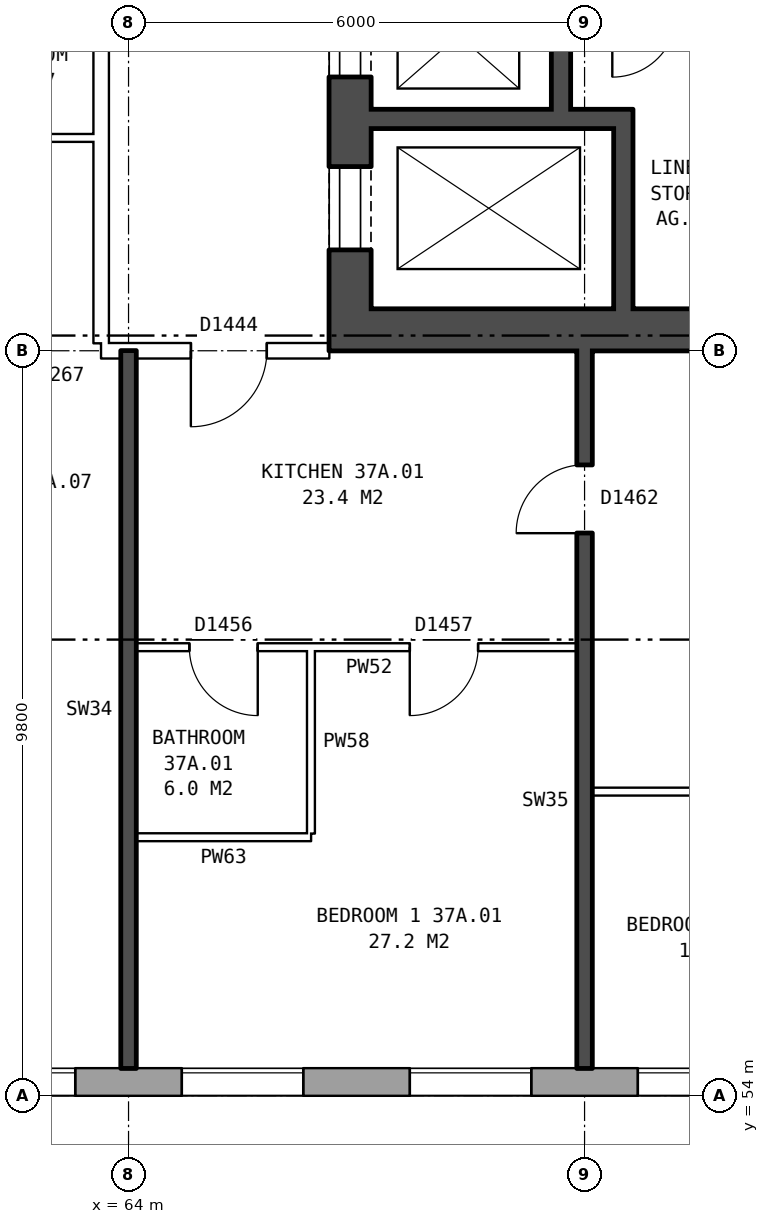
"""IFC4 building model, lengths in metres.
Left out: names, types, materials, properties, quantities, classifications, styles, units other than length and angle.
Written with IfcOpenShell. Run it as: python <this file> out.ifc"""

import sys

from ifc_helpers import new_model, si_unit, direction, frame, frame_2d, origin, place, context, subcontext, project, spatial, rectangle, extrude, element, fill, save


model = new_model("IFC4")
c1 = context("Model", 3, precision=1e-05, world=origin(), true_north=direction((0.0, 1.0)))
c2 = subcontext(c1, "Body", "Model", "MODEL_VIEW")
j1 = project(units=[si_unit("LENGTHUNIT", "METRE"), si_unit("PLANEANGLEUNIT", "RADIAN")], contexts=[c1])
p1 = place(None, origin())
s1 = spatial("IfcSite", under=j1, at=p1, CompositionType="ELEMENT")
p2 = place(p1, origin())
s2 = spatial("IfcBuilding", under=s1, at=p2, CompositionType="ELEMENT")
p3 = place(p2, frame((0.0, 0.0, 133.0)))
s3 = spatial("IfcBuildingStorey", under=s2, at=p3, CompositionType="ELEMENT", Elevation=133.0)
p4 = place(p3, frame((29.825, 54.18, 0.0), z_axis=(0.0, 0.0, 1.0), x_axis=(1.0, 0.0, 0.0)))
e1 = element("IfcWall", 1, at=p4, inside=s3, PredefinedType="STANDARD", context=c2, shape_type="SweptSolid", body=[
    extrude(rectangle(XDim=43.101, YDim=0.36, at=frame_2d((21.55, 0.0))), origin(), (0.0, 0.0, 1.0), 2.85),
])
p5 = place(p4, frame((1.875, 0.0, 0.8)))
e2 = element("IfcOpeningElement", 2, at=p5, cuts=e1, PredefinedType="OPENING", context=c2, shape_type="SweptSolid", body=[
    extrude(rectangle(XDim=1.6, YDim=1.8, at=frame_2d((0.8, 0.9))), frame((0.0, 0.19, 0.0), z_axis=(0.0, -1.0, 0.0), x_axis=(1.0, 0.0, 0.0)), (0.0, 0.0, 1.0), 0.38),
])
p6 = place(p4, frame((4.875, 0.0, 0.8)))
e3 = element("IfcOpeningElement", 3, at=p6, cuts=e1, PredefinedType="OPENING", context=c2, shape_type="SweptSolid", body=[
    extrude(rectangle(XDim=1.6, YDim=1.8, at=frame_2d((0.8, 0.9))), frame((0.0, 0.19, 0.0), z_axis=(0.0, -1.0, 0.0), x_axis=(1.0, 0.0, 0.0)), (0.0, 0.0, 1.0), 0.38),
])
p7 = place(p4, frame((7.875, 0.0, 0.8)))
e4 = element("IfcOpeningElement", 4, at=p7, cuts=e1, PredefinedType="OPENING", context=c2, shape_type="SweptSolid", body=[
    extrude(rectangle(XDim=1.6, YDim=1.8, at=frame_2d((0.8, 0.9))), frame((0.0, 0.19, 0.0), z_axis=(0.0, -1.0, 0.0), x_axis=(1.0, 0.0, 0.0)), (0.0, 0.0, 1.0), 0.38),
])
p8 = place(p4, frame((10.875, 0.0, 0.8)))
e5 = element("IfcOpeningElement", 5, at=p8, cuts=e1, PredefinedType="OPENING", context=c2, shape_type="SweptSolid", body=[
    extrude(rectangle(XDim=1.6, YDim=1.8, at=frame_2d((0.8, 0.9))), frame((0.0, 0.19, 0.0), z_axis=(0.0, -1.0, 0.0), x_axis=(1.0, 0.0, 0.0)), (0.0, 0.0, 1.0), 0.38),
])
p9 = place(p4, frame((14.275, 0.0, 0.8)))
e6 = element("IfcOpeningElement", 6, at=p9, cuts=e1, PredefinedType="OPENING", context=c2, shape_type="SweptSolid", body=[
    extrude(rectangle(XDim=0.8, YDim=0.9, at=frame_2d((0.4, 0.45))), frame((0.0, 0.19, 0.0), z_axis=(0.0, -1.0, 0.0), x_axis=(1.0, 0.0, 0.0)), (0.0, 0.0, 1.0), 0.38),
])
p10 = place(p4, frame((16.875, 0.0, 0.8)))
e7 = element("IfcOpeningElement", 7, at=p10, cuts=e1, PredefinedType="OPENING", context=c2, shape_type="SweptSolid", body=[
    extrude(rectangle(XDim=1.6, YDim=1.8, at=frame_2d((0.8, 0.9))), frame((0.0, 0.19, 0.0), z_axis=(0.0, -1.0, 0.0), x_axis=(1.0, 0.0, 0.0)), (0.0, 0.0, 1.0), 0.38),
])
p11 = place(p4, frame((19.875, 0.0, 0.8)))
e8 = element("IfcOpeningElement", 8, at=p11, cuts=e1, PredefinedType="OPENING", context=c2, shape_type="SweptSolid", body=[
    extrude(rectangle(XDim=1.6, YDim=1.8, at=frame_2d((0.8, 0.9))), frame((0.0, 0.19, 0.0), z_axis=(0.0, -1.0, 0.0), x_axis=(1.0, 0.0, 0.0)), (0.0, 0.0, 1.0), 0.38),
])
p12 = place(p4, frame((22.875, 0.0, 0.8)))
e9 = element("IfcOpeningElement", 9, at=p12, cuts=e1, PredefinedType="OPENING", context=c2, shape_type="SweptSolid", body=[
    extrude(rectangle(XDim=1.6, YDim=1.8, at=frame_2d((0.8, 0.9))), frame((0.0, 0.19, 0.0), z_axis=(0.0, -1.0, 0.0), x_axis=(1.0, 0.0, 0.0)), (0.0, 0.0, 1.0), 0.38),
])
p13 = place(p4, frame((25.875, 0.0, 0.8)))
e10 = element("IfcOpeningElement", 10, at=p13, cuts=e1, PredefinedType="OPENING", context=c2, shape_type="SweptSolid", body=[
    extrude(rectangle(XDim=1.6, YDim=1.8, at=frame_2d((0.8, 0.9))), frame((0.0, 0.19, 0.0), z_axis=(0.0, -1.0, 0.0), x_axis=(1.0, 0.0, 0.0)), (0.0, 0.0, 1.0), 0.38),
])
p14 = place(p4, frame((28.375, 0.0, 0.25)))
e11 = element("IfcOpeningElement", 11, at=p14, cuts=e1, PredefinedType="OPENING", context=c2, shape_type="SweptSolid", body=[
    extrude(rectangle(XDim=1.0, YDim=0.9, at=frame_2d((0.5, 0.45))), frame((0.0, 0.19, 0.0), z_axis=(0.0, -1.0, 0.0), x_axis=(1.0, 0.0, 0.0)), (0.0, 0.0, 1.0), 0.38),
])
p15 = place(p4, frame((31.875, 0.0, 0.8)))
e12 = element("IfcOpeningElement", 12, at=p15, cuts=e1, PredefinedType="OPENING", context=c2, shape_type="SweptSolid", body=[
    extrude(rectangle(XDim=1.6, YDim=1.8, at=frame_2d((0.8, 0.9))), frame((0.0, 0.19, 0.0), z_axis=(0.0, -1.0, 0.0), x_axis=(1.0, 0.0, 0.0)), (0.0, 0.0, 1.0), 0.38),
])
p16 = place(p4, frame((34.875, 0.0, 0.8)))
e13 = element("IfcOpeningElement", 13, at=p16, cuts=e1, PredefinedType="OPENING", context=c2, shape_type="SweptSolid", body=[
    extrude(rectangle(XDim=1.6, YDim=1.8, at=frame_2d((0.8, 0.9))), frame((0.0, 0.19, 0.0), z_axis=(0.0, -1.0, 0.0), x_axis=(1.0, 0.0, 0.0)), (0.0, 0.0, 1.0), 0.38),
])
p17 = place(p4, frame((37.875, 0.0, 0.8)))
e14 = element("IfcOpeningElement", 14, at=p17, cuts=e1, PredefinedType="OPENING", context=c2, shape_type="SweptSolid", body=[
    extrude(rectangle(XDim=1.6, YDim=1.8, at=frame_2d((0.8, 0.9))), frame((0.0, 0.19, 0.0), z_axis=(0.0, -1.0, 0.0), x_axis=(1.0, 0.0, 0.0)), (0.0, 0.0, 1.0), 0.38),
])
p18 = place(p4, frame((40.875, 0.0, 0.8)))
e15 = element("IfcOpeningElement", 15, at=p18, cuts=e1, PredefinedType="OPENING", context=c2, shape_type="SweptSolid", body=[
    extrude(rectangle(XDim=1.6, YDim=1.8, at=frame_2d((0.8, 0.9))), frame((0.0, 0.19, 0.0), z_axis=(0.0, -1.0, 0.0), x_axis=(1.0, 0.0, 0.0)), (0.0, 0.0, 1.0), 0.38),
])
p19 = place(p4, frame((15.375, 0.0, 0.8)))
e16 = element("IfcOpeningElement", 16, at=p19, cuts=e1, PredefinedType="OPENING", context=c2, shape_type="SweptSolid", body=[
    extrude(rectangle(XDim=0.6, YDim=1.8, at=frame_2d((0.3, 0.9))), frame((0.0, 0.19, 0.0), z_axis=(0.0, -1.0, 0.0), x_axis=(1.0, 0.0, 0.0)), (0.0, 0.0, 1.0), 0.38),
])
p20 = place(p4, frame((30.025, 0.0, 1.65)))
e17 = element("IfcOpeningElement", 17, at=p20, cuts=e1, PredefinedType="OPENING", context=c2, shape_type="SweptSolid", body=[
    extrude(rectangle(XDim=1.0, YDim=0.9, at=frame_2d((0.5, 0.45))), frame((0.0, 0.19, 0.0), z_axis=(0.0, -1.0, 0.0), x_axis=(1.0, 0.0, 0.0)), (0.0, 0.0, 1.0), 0.38),
])
p21 = place(p3, frame((66.915, 63.8, 0.0), z_axis=(0.0, 0.0, 1.0), x_axis=(0.0, 1.0, 0.0)))
e18 = element("IfcWall", 18, at=p21, inside=s3, PredefinedType="SHEAR", context=c2, shape_type="SweptSolid", body=[
    extrude(rectangle(XDim=12.4, YDim=0.55, at=frame_2d((6.2, 0.0))), origin(), (0.0, 0.0, 1.0), 2.85),
])
p22 = place(p21, frame((1.325, 0.0, 0.0)))
e19 = element("IfcOpeningElement", 19, at=p22, cuts=e18, PredefinedType="OPENING", context=c2, shape_type="SweptSolid", body=[
    extrude(rectangle(XDim=1.1, YDim=2.1, at=frame_2d((0.55, 1.05))), frame((0.0, 0.285, 0.0), z_axis=(0.0, -1.0, 0.0), x_axis=(1.0, 0.0, 0.0)), (0.0, 0.0, 1.0), 0.57),
])
p23 = place(p21, frame((3.6, 0.0, 0.0)))
e20 = element("IfcOpeningElement", 20, at=p23, cuts=e18, PredefinedType="OPENING", context=c2, shape_type="SweptSolid", body=[
    extrude(rectangle(XDim=1.1, YDim=2.1, at=frame_2d((0.55, 1.05))), frame((0.0, 0.285, 0.0), z_axis=(0.0, -1.0, 0.0), x_axis=(1.0, 0.0, 0.0)), (0.0, 0.0, 1.0), 0.57),
])
p24 = place(p21, frame((5.8, 0.0, 0.0)))
e21 = element("IfcOpeningElement", 21, at=p24, cuts=e18, PredefinedType="OPENING", context=c2, shape_type="SweptSolid", body=[
    extrude(rectangle(XDim=1.1, YDim=2.1, at=frame_2d((0.55, 1.05))), frame((0.0, 0.285, 0.0), z_axis=(0.0, -1.0, 0.0), x_axis=(1.0, 0.0, 0.0)), (0.0, 0.0, 1.0), 0.57),
])
p25 = place(p21, frame((8.0, 0.0, 0.0)))
e22 = element("IfcOpeningElement", 22, at=p25, cuts=e18, PredefinedType="OPENING", context=c2, shape_type="SweptSolid", body=[
    extrude(rectangle(XDim=1.1, YDim=2.1, at=frame_2d((0.55, 1.05))), frame((0.0, 0.285, 0.0), z_axis=(0.0, -1.0, 0.0), x_axis=(1.0, 0.0, 0.0)), (0.0, 0.0, 1.0), 0.57),
])
p26 = place(p21, frame((9.9, 0.0, 0.0)))
e23 = element("IfcOpeningElement", 23, at=p26, cuts=e18, PredefinedType="OPENING", context=c2, shape_type="SweptSolid", body=[
    extrude(rectangle(XDim=1.1, YDim=2.1, at=frame_2d((0.55, 1.05))), frame((0.0, 0.285, 0.0), z_axis=(0.0, -1.0, 0.0), x_axis=(1.0, 0.0, 0.0)), (0.0, 0.0, 1.0), 0.57),
])
p27 = place(p3, frame((67.19, 64.075, 0.0), z_axis=(0.0, 0.0, 1.0), x_axis=(1.0, 0.0, 0.0)))
e24 = element("IfcWall", 24, at=p27, inside=s3, PredefinedType="SHEAR", context=c2, shape_type="SweptSolid", body=[
    extrude(rectangle(XDim=7.9, YDim=0.55, at=frame_2d((3.95, 0.0))), origin(), (0.0, 0.0, 1.0), 2.85),
])
p28 = place(p3, frame((67.19, 66.85, 0.0), z_axis=(0.0, 0.0, 1.0), x_axis=(1.0, 0.0, 0.0)))
e25 = element("IfcWall", 25, at=p28, inside=s3, PredefinedType="SHEAR", context=c2, shape_type="SweptSolid", body=[
    extrude(rectangle(XDim=3.445, YDim=0.25, at=frame_2d((1.723, 0.0))), origin(), (0.0, 0.0, 1.0), 2.85),
])
p29 = place(p3, frame((69.69, 66.975, 0.0), z_axis=(0.0, 0.0, 1.0), x_axis=(0.0, 1.0, 0.0)))
e26 = element("IfcWall", 26, at=p29, inside=s3, PredefinedType="SHEAR", context=c2, shape_type="SweptSolid", body=[
    extrude(rectangle(XDim=6.6, YDim=0.25, at=frame_2d((3.3, 0.0))), origin(), (0.0, 0.0, 1.0), 2.85),
])
p30 = place(p3, frame((70.51, 64.35, 0.0), z_axis=(0.0, 0.0, 1.0), x_axis=(0.0, 1.0, 0.0)))
e27 = element("IfcWall", 27, at=p30, inside=s3, PredefinedType="SHEAR", context=c2, shape_type="SweptSolid", body=[
    extrude(rectangle(XDim=2.375, YDim=0.25, at=frame_2d((1.188, 0.0))), origin(), (0.0, 0.0, 1.0), 2.85),
])
p31 = place(p3, frame((63.64, 63.9, 0.0), z_axis=(0.0, 0.0, 1.0), x_axis=(0.0, 1.0, 0.0)))
e28 = element("IfcWall", 28, at=p31, inside=s3, PredefinedType="PARTITIONING", context=c2, shape_type="SweptSolid", body=[
    extrude(rectangle(XDim=12.2, YDim=0.2, at=frame_2d((6.1, 0.0))), origin(), (0.0, 0.0, 1.0), 2.85),
])
p32 = place(p31, frame((5.1, 0.0, 0.0)))
e29 = element("IfcOpeningElement", 29, at=p32, cuts=e28, PredefinedType="OPENING", context=c2, shape_type="SweptSolid", body=[
    extrude(rectangle(XDim=2.0, YDim=2.1, at=frame_2d((1.0, 1.05))), frame((0.0, 0.11, 0.0), z_axis=(0.0, -1.0, 0.0), x_axis=(1.0, 0.0, 0.0)), (0.0, 0.0, 1.0), 0.22),
])
p33 = place(p3, frame((64.1, 57.4, 0.0), z_axis=(0.0, 0.0, 1.0), x_axis=(1.0, 0.0, 0.0)))
e30 = element("IfcWall", 30, at=p33, inside=s3, PredefinedType="PARTITIONING", context=c2, shape_type="SweptSolid", body=[
    extrude(rectangle(XDim=2.3, YDim=0.1, at=frame_2d((1.15, 0.0))), origin(), (0.0, 0.0, 1.0), 2.85),
])
p34 = place(p3, frame((70.1, 58.0, 0.0), z_axis=(0.0, 0.0, 1.0), x_axis=(1.0, 0.0, 0.0)))
e31 = element("IfcWall", 31, at=p34, inside=s3, PredefinedType="PARTITIONING", context=c2, shape_type="SweptSolid", body=[
    extrude(rectangle(XDim=5.54, YDim=0.1, at=frame_2d((2.77, 0.0))), origin(), (0.0, 0.0, 1.0), 2.85),
])
p35 = place(p34, frame((2.32, 0.0, 0.0)))
e32 = element("IfcOpeningElement", 32, at=p35, cuts=e31, PredefinedType="OPENING", context=c2, shape_type="SweptSolid", body=[
    extrude(rectangle(XDim=0.9, YDim=2.1, at=frame_2d((0.45, 1.05))), frame((0.0, 0.06, 0.0), z_axis=(0.0, -1.0, 0.0), x_axis=(1.0, 0.0, 0.0)), (0.0, 0.0, 1.0), 0.12),
])
p36 = place(p3, frame((64.1, 59.9, 0.0), z_axis=(0.0, 0.0, 1.0), x_axis=(1.0, 0.0, 0.0)))
e33 = element("IfcWall", 33, at=p36, inside=s3, PredefinedType="PARTITIONING", context=c2, shape_type="SweptSolid", body=[
    extrude(rectangle(XDim=5.8, YDim=0.1, at=frame_2d((2.9, 0.0))), origin(), (0.0, 0.0, 1.0), 2.85),
])
p37 = place(p36, frame((3.6, 0.0, 0.0)))
e34 = element("IfcOpeningElement", 34, at=p37, cuts=e33, PredefinedType="OPENING", context=c2, shape_type="SweptSolid", body=[
    extrude(rectangle(XDim=0.9, YDim=2.1, at=frame_2d((0.45, 1.05))), frame((0.0, 0.06, 0.0), z_axis=(0.0, -1.0, 0.0), x_axis=(1.0, 0.0, 0.0)), (0.0, 0.0, 1.0), 0.12),
])
p38 = place(p36, frame((0.7, 0.0, 0.0)))
e35 = element("IfcOpeningElement", 35, at=p38, cuts=e33, PredefinedType="OPENING", context=c2, shape_type="SweptSolid", body=[
    extrude(rectangle(XDim=0.9, YDim=2.1, at=frame_2d((0.45, 1.05))), frame((0.0, 0.06, 0.0), z_axis=(0.0, -1.0, 0.0), x_axis=(1.0, 0.0, 0.0)), (0.0, 0.0, 1.0), 0.12),
])
p39 = place(p3, frame((63.64, 63.8, 0.0), z_axis=(0.0, 0.0, 1.0), x_axis=(1.0, 0.0, 0.0)))
e36 = element("IfcWall", 36, at=p39, inside=s3, PredefinedType="PARTITIONING", context=c2, shape_type="SweptSolid", body=[
    extrude(rectangle(XDim=3.0, YDim=0.2, at=frame_2d((1.5, 0.0))), origin(), (0.0, 0.0, 1.0), 2.85),
])
p40 = place(p39, frame((1.18, 0.0, 0.0)))
e37 = element("IfcOpeningElement", 37, at=p40, cuts=e36, PredefinedType="OPENING", context=c2, shape_type="SweptSolid", body=[
    extrude(rectangle(XDim=1.0, YDim=2.1, at=frame_2d((0.5, 1.05))), frame((0.0, 0.11, 0.0), z_axis=(0.0, -1.0, 0.0), x_axis=(1.0, 0.0, 0.0)), (0.0, 0.0, 1.0), 0.22),
])
p41 = place(p3, frame((61.0, 66.6, 0.0), z_axis=(0.0, 0.0, 1.0), x_axis=(1.0, 0.0, 0.0)))
e38 = element("IfcWall", 38, at=p41, inside=s3, PredefinedType="PARTITIONING", context=c2, shape_type="SweptSolid", body=[
    extrude(rectangle(XDim=2.64, YDim=0.1, at=frame_2d((1.32, 0.0))), origin(), (0.0, 0.0, 1.0), 2.85),
])
p42 = place(p3, frame((64.0, 54.36, 0.0), z_axis=(0.0, 0.0, 1.0), x_axis=(0.0, 1.0, 0.0)))
e39 = element("IfcWall", 39, at=p42, inside=s3, PredefinedType="SOLIDWALL", context=c2, shape_type="SweptSolid", body=[
    extrude(rectangle(XDim=9.44, YDim=0.2, at=frame_2d((4.72, 0.0))), origin(), (0.0, 0.0, 1.0), 2.85),
])
p43 = place(p3, frame((66.4, 57.45, 0.0), z_axis=(0.0, 0.0, 1.0), x_axis=(0.0, 1.0, 0.0)))
e40 = element("IfcWall", 40, at=p43, inside=s3, PredefinedType="PARTITIONING", context=c2, shape_type="SweptSolid", body=[
    extrude(rectangle(XDim=2.4, YDim=0.1, at=frame_2d((1.2, 0.0))), origin(), (0.0, 0.0, 1.0), 2.85),
])
p44 = place(p3, frame((70.0, 54.36, 0.0), z_axis=(0.0, 0.0, 1.0), x_axis=(0.0, 1.0, 0.0)))
e41 = element("IfcWall", 41, at=p44, inside=s3, PredefinedType="SOLIDWALL", context=c2, shape_type="SweptSolid", body=[
    extrude(rectangle(XDim=9.44, YDim=0.2, at=frame_2d((4.72, 0.0))), origin(), (0.0, 0.0, 1.0), 2.85),
])
p45 = place(p44, frame((7.04, 0.0, 0.0)))
e42 = element("IfcOpeningElement", 42, at=p45, cuts=e41, PredefinedType="OPENING", context=c2, shape_type="SweptSolid", body=[
    extrude(rectangle(XDim=0.9, YDim=2.1, at=frame_2d((0.45, 1.05))), frame((0.0, 0.11, 0.0), z_axis=(0.0, -1.0, 0.0), x_axis=(1.0, 0.0, 0.0)), (0.0, 0.0, 1.0), 0.22),
])
p46 = place(p15, origin())
e43 = element("IfcWindow", 43, at=p46, inside=s3, PartitioningType="SINGLE_PANEL", PredefinedType="WINDOW", context=c2, shape_type="SweptSolid", body=[
    extrude(rectangle(XDim=1.6, YDim=1.8, at=frame_2d((0.8, 0.9))), frame((0.0, 0.15, 0.0), z_axis=(0.0, -1.0, 0.0), x_axis=(1.0, 0.0, 0.0)), (0.0, 0.0, 1.0), 0.06),
])
fill(e12, e43)
p47 = place(p16, origin())
e44 = element("IfcWindow", 44, at=p47, inside=s3, PartitioningType="SINGLE_PANEL", PredefinedType="WINDOW", context=c2, shape_type="SweptSolid", body=[
    extrude(rectangle(XDim=1.6, YDim=1.8, at=frame_2d((0.8, 0.9))), frame((0.0, 0.15, 0.0), z_axis=(0.0, -1.0, 0.0), x_axis=(1.0, 0.0, 0.0)), (0.0, 0.0, 1.0), 0.06),
])
fill(e13, e44)
p48 = place(p17, origin())
e45 = element("IfcWindow", 45, at=p48, inside=s3, PartitioningType="SINGLE_PANEL", PredefinedType="WINDOW", context=c2, shape_type="SweptSolid", body=[
    extrude(rectangle(XDim=1.6, YDim=1.8, at=frame_2d((0.8, 0.9))), frame((0.0, 0.15, 0.0), z_axis=(0.0, -1.0, 0.0), x_axis=(1.0, 0.0, 0.0)), (0.0, 0.0, 1.0), 0.06),
])
fill(e14, e45)
p49 = place(p18, origin())
e46 = element("IfcWindow", 46, at=p49, inside=s3, PartitioningType="SINGLE_PANEL", PredefinedType="WINDOW", context=c2, shape_type="SweptSolid", body=[
    extrude(rectangle(XDim=1.6, YDim=1.8, at=frame_2d((0.8, 0.9))), frame((0.0, 0.15, 0.0), z_axis=(0.0, -1.0, 0.0), x_axis=(1.0, 0.0, 0.0)), (0.0, 0.0, 1.0), 0.06),
])
fill(e15, e46)
p50 = place(p22, origin())
e47 = element("IfcDoor", 47, at=p50, inside=s3, OperationType="DOUBLE_DOOR_SLIDING", PredefinedType="DOOR", context=c2, shape_type="SweptSolid", body=[
    extrude(rectangle(XDim=1.1, YDim=2.1, at=frame_2d((0.55, 1.05))), frame((0.0, -0.21, 0.0), z_axis=(0.0, -1.0, 0.0), x_axis=(1.0, 0.0, 0.0)), (0.0, 0.0, 1.0), 0.05),
])
fill(e19, e47)
p51 = place(p23, origin())
e48 = element("IfcDoor", 48, at=p51, inside=s3, OperationType="DOUBLE_DOOR_SLIDING", PredefinedType="DOOR", context=c2, shape_type="SweptSolid", body=[
    extrude(rectangle(XDim=1.1, YDim=2.1, at=frame_2d((0.55, 1.05))), frame((0.0, -0.21, 0.0), z_axis=(0.0, -1.0, 0.0), x_axis=(1.0, 0.0, 0.0)), (0.0, 0.0, 1.0), 0.05),
])
fill(e20, e48)
p52 = place(p37, frame((0.9, 0.0, 0.0), z_axis=(0.0, 0.0, 1.0), x_axis=(-1.0, 0.0, 0.0)))
e49 = element("IfcDoor", 49, at=p52, inside=s3, OperationType="SINGLE_SWING_RIGHT", PredefinedType="DOOR", context=c2, shape_type="SweptSolid", body=[
    extrude(rectangle(XDim=0.9, YDim=2.1, at=frame_2d((0.45, 1.05))), frame((0.0, 0.025, 0.0), z_axis=(0.0, -1.0, 0.0), x_axis=(1.0, 0.0, 0.0)), (0.0, 0.0, 1.0), 0.05),
])
fill(e34, e49)
p53 = place(p40, frame((1.0, 0.0, 0.0), z_axis=(0.0, 0.0, 1.0), x_axis=(-1.0, 0.0, 0.0)))
e50 = element("IfcDoor", 50, at=p53, inside=s3, OperationType="SINGLE_SWING_RIGHT", PredefinedType="DOOR", context=c2, shape_type="SweptSolid", body=[
    extrude(rectangle(XDim=1.0, YDim=2.1, at=frame_2d((0.5, 1.05))), frame((0.0, 0.025, 0.0), z_axis=(0.0, -1.0, 0.0), x_axis=(1.0, 0.0, 0.0)), (0.0, 0.0, 1.0), 0.05),
])
fill(e37, e50)
p54 = place(p45, origin())
e51 = element("IfcDoor", 51, at=p54, inside=s3, OperationType="SINGLE_SWING_LEFT", PredefinedType="DOOR", context=c2, shape_type="SweptSolid", body=[
    extrude(rectangle(XDim=0.9, YDim=2.1, at=frame_2d((0.45, 1.05))), frame((0.0, 0.025, 0.0), z_axis=(0.0, -1.0, 0.0), x_axis=(1.0, 0.0, 0.0)), (0.0, 0.0, 1.0), 0.05),
])
fill(e42, e51)
p55 = place(p38, frame((0.9, 0.0, 0.0), z_axis=(0.0, 0.0, 1.0), x_axis=(-1.0, 0.0, 0.0)))
e52 = element("IfcDoor", 52, at=p55, inside=s3, OperationType="SINGLE_SWING_LEFT", PredefinedType="DOOR", context=c2, shape_type="SweptSolid", body=[
    extrude(rectangle(XDim=0.9, YDim=2.1, at=frame_2d((0.45, 1.05))), frame((0.0, 0.025, 0.0), z_axis=(0.0, -1.0, 0.0), x_axis=(1.0, 0.0, 0.0)), (0.0, 0.0, 1.0), 0.05),
])
fill(e35, e52)
save(model, sys.argv[1])
